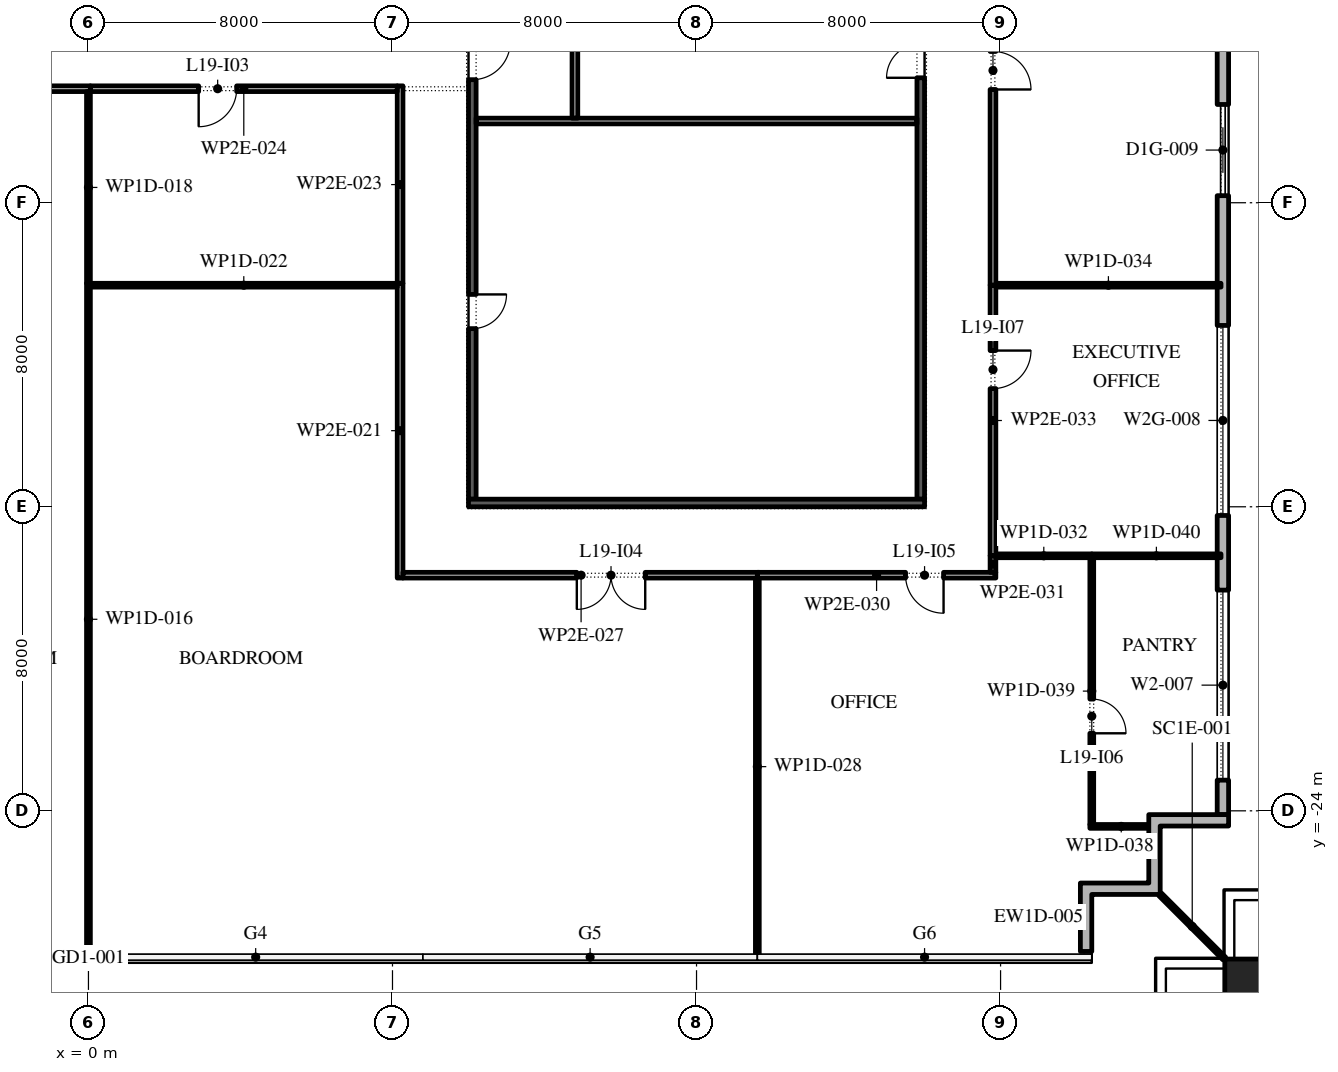
"""IFC4 building model, lengths in metres.
Left out: names, types, materials, properties, quantities, classifications, styles, units other than length and angle.
Written with IfcOpenShell. Run it as: python <this file> out.ifc"""

import sys

from ifc_helpers import new_model, si_unit, direction, frame, frame_2d, origin, origin_2d, place, context, subcontext, project, spatial, polyline, rectangle, outline, extrude, element, fill, save


model = new_model("IFC4")
c1 = context("Model", 3, precision=1e-05, world=origin(), true_north=direction((0.0, 1.0)))
c2 = subcontext(c1, "Body", "Model", "MODEL_VIEW")
j1 = project(units=[si_unit("LENGTHUNIT", "METRE"), si_unit("PLANEANGLEUNIT", "RADIAN")], contexts=[c1])
p1 = place(None, origin())
s1 = spatial("IfcSite", under=j1, at=p1, CompositionType="ELEMENT")
p2 = place(p1, origin())
s2 = spatial("IfcBuilding", under=s1, at=p2, CompositionType="ELEMENT")
p3 = place(p2, frame((0.0, 0.0, 90.0)))
s3 = spatial("IfcBuildingStorey", under=s2, at=p3, CompositionType="ELEMENT", Elevation=90.0)
p4 = place(p3, frame((30.6, -28.6, 0.0), z_axis=(0.0, 0.0, 1.0), x_axis=(1.0, 0.0, 0.0)))
e1 = element("IfcColumn", 1, at=p4, inside=s3, PredefinedType="COLUMN", context=c2, shape_type="SweptSolid", body=[
    extrude(rectangle(XDim=1.4, YDim=1.4, at=origin_2d()), origin(), (0.0, 0.0, 1.0), 4.2),
])
p5 = place(p3, frame((-8.8, -27.85, 0.0), z_axis=(0.0, 0.0, 1.0), x_axis=(1.0, 0.0, 0.0)))
e2 = element("IfcWall", 2, at=p5, inside=s3, PredefinedType="STANDARD", context=c2, shape_type="SweptSolid", body=[
    extrude(rectangle(XDim=8.8, YDim=0.3, at=frame_2d((4.4, 0.0))), origin(), (0.0, 0.0, 1.0), 3.9),
])
p6 = place(p5, frame((3.2, 0.0, 0.0)))
e3 = element("IfcOpeningElement", 3, at=p6, cuts=e2, PredefinedType="OPENING", context=c2, shape_type="SweptSolid", body=[
    extrude(rectangle(XDim=2.4, YDim=3.5, at=frame_2d((1.2, 1.75))), frame((0.0, 0.16, 0.0), z_axis=(0.0, -1.0, 0.0), x_axis=(1.0, 0.0, 0.0)), (0.0, 0.0, 1.0), 0.32),
])
p7 = place(p3, frame((29.85, -24.1, 0.0), z_axis=(0.0, 0.0, 1.0), x_axis=(0.0, 1.0, 0.0)))
e4 = element("IfcWall", 4, at=p7, inside=s3, PredefinedType="STANDARD", context=c2, shape_type="SweptSolid", body=[
    extrude(rectangle(XDim=49.5, YDim=0.3, at=frame_2d((24.75, 0.0))), origin(), (0.0, 0.0, 1.0), 3.9),
])
p8 = place(p7, frame((0.907, 0.0, 0.45)))
e5 = element("IfcOpeningElement", 5, at=p8, cuts=e4, PredefinedType="OPENING", context=c2, shape_type="SweptSolid", body=[
    extrude(rectangle(XDim=5.0, YDim=3.25, at=frame_2d((2.5, 1.625))), frame((0.0, 0.16, 0.0), z_axis=(0.0, -1.0, 0.0), x_axis=(1.0, 0.0, 0.0)), (0.0, 0.0, 1.0), 0.32),
])
p9 = place(p7, frame((7.871, 0.0, 0.45)))
e6 = element("IfcOpeningElement", 6, at=p9, cuts=e4, PredefinedType="OPENING", context=c2, shape_type="SweptSolid", body=[
    extrude(rectangle(XDim=5.0, YDim=2.725, at=frame_2d((2.5, 1.363))), frame((0.0, 0.16, 0.0), z_axis=(0.0, -1.0, 0.0), x_axis=(1.0, 0.0, 0.0)), (0.0, 0.0, 1.0), 0.32),
])
p10 = place(p7, frame((16.286, 0.0, 0.0)))
e7 = element("IfcOpeningElement", 7, at=p10, cuts=e4, PredefinedType="OPENING", context=c2, shape_type="SweptSolid", body=[
    extrude(rectangle(XDim=2.4, YDim=3.225, at=frame_2d((1.2, 1.613))), frame((0.0, 0.16, 0.0), z_axis=(0.0, -1.0, 0.0), x_axis=(1.0, 0.0, 0.0)), (0.0, 0.0, 1.0), 0.32),
])
p11 = place(p7, frame((22.1, 0.0, 0.45)))
e8 = element("IfcOpeningElement", 8, at=p11, cuts=e4, PredefinedType="OPENING", context=c2, shape_type="SweptSolid", body=[
    extrude(rectangle(XDim=5.0, YDim=3.25, at=frame_2d((2.5, 1.625))), frame((0.0, 0.16, 0.0), z_axis=(0.0, -1.0, 0.0), x_axis=(1.0, 0.0, 0.0)), (0.0, 0.0, 1.0), 0.32),
])
p12 = place(p7, frame((29.214, 0.0, 0.45)))
e9 = element("IfcOpeningElement", 9, at=p12, cuts=e4, PredefinedType="OPENING", context=c2, shape_type="SweptSolid", body=[
    extrude(rectangle(XDim=5.0, YDim=2.775, at=frame_2d((2.5, 1.387))), frame((0.0, 0.16, 0.0), z_axis=(0.0, -1.0, 0.0), x_axis=(1.0, 0.0, 0.0)), (0.0, 0.0, 1.0), 0.32),
])
p13 = place(p7, frame((36.329, 0.0, 0.45)))
e10 = element("IfcOpeningElement", 10, at=p13, cuts=e4, PredefinedType="OPENING", context=c2, shape_type="SweptSolid", body=[
    extrude(rectangle(XDim=5.0, YDim=3.25, at=frame_2d((2.5, 1.625))), frame((0.0, 0.16, 0.0), z_axis=(0.0, -1.0, 0.0), x_axis=(1.0, 0.0, 0.0)), (0.0, 0.0, 1.0), 0.32),
])
p14 = place(p7, frame((44.743, 0.0, 0.0)))
e11 = element("IfcOpeningElement", 11, at=p14, cuts=e4, PredefinedType="OPENING", context=c2, shape_type="SweptSolid", body=[
    extrude(rectangle(XDim=2.4, YDim=3.225, at=frame_2d((1.2, 1.613))), frame((0.0, 0.16, 0.0), z_axis=(0.0, -1.0, 0.0), x_axis=(1.0, 0.0, 0.0)), (0.0, 0.0, 1.0), 0.32),
])
p15 = place(p3, origin())
e12 = element("IfcWall", 12, at=p15, inside=s3, PredefinedType="STANDARD", context=c2, shape_type="SweptSolid", body=[
    extrude(outline(polyline([(27.9, -25.9), (27.9, -24.1), (30.0, -24.1), (30.0, -24.4), (28.2, -24.4), (28.2, -26.2), (26.4, -26.2), (26.4, -27.7), (26.1, -27.7), (26.1, -25.9), (27.9, -25.9)])), origin(), (0.0, 0.0, 1.0), 3.9),
])
p16 = place(p3, frame((28.2, -26.2, -0.05), z_axis=(0.0, 0.0, 1.0), x_axis=(0.707106781187, -0.707106781187, 0.0)))
e13 = element("IfcWall", 13, at=p16, inside=s3, PredefinedType="STANDARD", context=c2, shape_type="SweptSolid", body=[
    extrude(rectangle(XDim=2.385, YDim=0.1, at=frame_2d((1.192, 0.0))), origin(), (0.0, 0.0, 1.0), 3.95),
])
p17 = place(p3, frame((21.9, -15.8, 0.0), z_axis=(0.0, 0.0, 1.0), x_axis=(0.0, 1.0, 0.0)))
e14 = element("IfcWall", 14, at=p17, inside=s3, PredefinedType="SHEAR", context=c2, shape_type="SweptSolid", body=[
    extrude(rectangle(XDim=13.05, YDim=0.2, at=frame_2d((6.525, 0.0))), origin(), (0.0, 0.0, 1.0), 3.9),
])
p18 = place(p17, frame((11.087, 0.0, 0.0)))
e15 = element("IfcOpeningElement", 15, at=p18, cuts=e14, PredefinedType="OPENING", context=c2, shape_type="SweptSolid", body=[
    extrude(rectangle(XDim=0.9, YDim=2.1, at=frame_2d((0.45, 1.05))), frame((0.0, 0.11, 0.0), z_axis=(0.0, -1.0, 0.0), x_axis=(1.0, 0.0, 0.0)), (0.0, 0.0, 1.0), 0.22),
])
p19 = place(p3, frame((10.1, -15.8, 0.0), z_axis=(0.0, 0.0, 1.0), x_axis=(0.0, 1.0, 0.0)))
e16 = element("IfcWall", 16, at=p19, inside=s3, PredefinedType="SHEAR", context=c2, shape_type="SweptSolid", body=[
    extrude(rectangle(XDim=13.05, YDim=0.2, at=frame_2d((6.525, 0.0))), origin(), (0.0, 0.0, 1.0), 3.9),
])
p20 = place(p19, frame((4.488, 0.0, 0.0)))
e17 = element("IfcOpeningElement", 17, at=p20, cuts=e16, PredefinedType="OPENING", context=c2, shape_type="SweptSolid", body=[
    extrude(rectangle(XDim=0.9, YDim=2.1, at=frame_2d((0.45, 1.05))), frame((0.0, 0.11, 0.0), z_axis=(0.0, -1.0, 0.0), x_axis=(1.0, 0.0, 0.0)), (0.0, 0.0, 1.0), 0.22),
])
p21 = place(p19, frame((11.038, 0.0, 0.0)))
e18 = element("IfcOpeningElement", 18, at=p21, cuts=e16, PredefinedType="OPENING", context=c2, shape_type="SweptSolid", body=[
    extrude(rectangle(XDim=1.0, YDim=2.1, at=frame_2d((0.5, 1.05))), frame((0.0, 0.11, 0.0), z_axis=(0.0, -1.0, 0.0), x_axis=(1.0, 0.0, 0.0)), (0.0, 0.0, 1.0), 0.22),
])
p22 = place(p3, frame((10.0, -15.9, 0.0), z_axis=(0.0, 0.0, 1.0), x_axis=(1.0, 0.0, 0.0)))
e19 = element("IfcWall", 19, at=p22, inside=s3, PredefinedType="SHEAR", context=c2, shape_type="SweptSolid", body=[
    extrude(rectangle(XDim=12.0, YDim=0.2, at=frame_2d((6.0, 0.0))), origin(), (0.0, 0.0, 1.0), 3.9),
])
p23 = place(p3, frame((10.2, -5.85, 0.0), z_axis=(0.0, 0.0, 1.0), x_axis=(1.0, 0.0, 0.0)))
e20 = element("IfcWall", 20, at=p23, inside=s3, PredefinedType="PARTITIONING", context=c2, shape_type="SweptSolid", body=[
    extrude(rectangle(XDim=11.6, YDim=0.15, at=frame_2d((5.8, 0.0))), origin(), (0.0, 0.0, 1.0), 3.9),
])
p24 = place(p3, frame((12.8, -5.775, 0.0), z_axis=(0.0, 0.0, 1.0), x_axis=(0.0, 1.0, 0.0)))
e21 = element("IfcWall", 21, at=p24, inside=s3, PredefinedType="PARTITIONING", context=c2, shape_type="SweptSolid", body=[
    extrude(rectangle(XDim=3.025, YDim=0.15, at=frame_2d((1.512, 0.0))), origin(), (0.0, 0.0, 1.0), 3.9),
])
p25 = place(p3, frame((0.0, -10.12, 0.0), z_axis=(0.0, 0.0, 1.0), x_axis=(0.0, -1.0, 0.0)))
e22 = element("IfcWall", 22, at=p25, inside=s3, PredefinedType="PARTITIONING", context=c2, shape_type="SweptSolid", body=[
    extrude(rectangle(XDim=17.68, YDim=0.1, at=frame_2d((8.84, 0.0))), origin(), (0.0, 0.0, 1.0), 3.9),
])
p26 = place(p3, frame((0.05, -5.0, 0.0), z_axis=(0.0, 0.0, 1.0), x_axis=(-1.0, 0.0, 0.0)))
e23 = element("IfcWall", 23, at=p26, inside=s3, PredefinedType="PARTITIONING", context=c2, shape_type="SweptSolid", body=[
    extrude(rectangle(XDim=8.175, YDim=0.15, at=frame_2d((4.087, 0.0))), origin(), (0.0, 0.0, 1.0), 3.9),
])
p27 = place(p3, frame((0.0, -5.075, 0.0), z_axis=(0.0, 0.0, 1.0), x_axis=(0.0, -1.0, 0.0)))
e24 = element("IfcWall", 24, at=p27, inside=s3, PredefinedType="PARTITIONING", context=c2, shape_type="SweptSolid", body=[
    extrude(rectangle(XDim=5.045, YDim=0.1, at=frame_2d((2.522, 0.0))), origin(), (0.0, 0.0, 1.0), 3.9),
])
p28 = place(p3, frame((8.2, -17.875, 0.0), z_axis=(0.0, 0.0, 1.0), x_axis=(0.0, 1.0, 0.0)))
e25 = element("IfcWall", 25, at=p28, inside=s3, PredefinedType="PARTITIONING", context=c2, shape_type="SweptSolid", body=[
    extrude(rectangle(XDim=7.755, YDim=0.15, at=frame_2d((3.877, 0.0))), origin(), (0.0, 0.0, 1.0), 3.9),
])
p29 = place(p3, frame((8.125, -10.17, 0.0), z_axis=(0.0, 0.0, 1.0), x_axis=(-1.0, 0.0, 0.0)))
e26 = element("IfcWall", 26, at=p29, inside=s3, PredefinedType="PARTITIONING", context=c2, shape_type="SweptSolid", body=[
    extrude(rectangle(XDim=8.075, YDim=0.1, at=frame_2d((4.038, 0.0))), origin(), (0.0, 0.0, 1.0), 3.9),
])
p30 = place(p3, frame((8.2, -10.12, 0.0), z_axis=(0.0, 0.0, 1.0), x_axis=(0.0, 1.0, 0.0)))
e27 = element("IfcWall", 27, at=p30, inside=s3, PredefinedType="PARTITIONING", context=c2, shape_type="SweptSolid", body=[
    extrude(rectangle(XDim=5.195, YDim=0.15, at=frame_2d((2.598, 0.0))), origin(), (0.0, 0.0, 1.0), 3.9),
])
p31 = place(p3, frame((8.125, -5.0, 0.0), z_axis=(0.0, 0.0, 1.0), x_axis=(-1.0, 0.0, 0.0)))
e28 = element("IfcWall", 28, at=p31, inside=s3, PredefinedType="PARTITIONING", context=c2, shape_type="SweptSolid", body=[
    extrude(rectangle(XDim=8.075, YDim=0.15, at=frame_2d((4.038, 0.0))), origin(), (0.0, 0.0, 1.0), 3.9),
])
p32 = place(p31, frame((4.225, 0.0, 0.0)))
e29 = element("IfcOpeningElement", 29, at=p32, cuts=e28, PredefinedType="OPENING", context=c2, shape_type="SweptSolid", body=[
    extrude(rectangle(XDim=1.0, YDim=2.1, at=frame_2d((0.5, 1.05))), frame((0.0, 0.085, 0.0), z_axis=(0.0, -1.0, 0.0), x_axis=(1.0, 0.0, 0.0)), (0.0, 0.0, 1.0), 0.17),
])
p33 = place(p3, frame((17.65, -17.8, 0.0), z_axis=(0.0, 0.0, 1.0), x_axis=(-1.0, 0.0, 0.0)))
e30 = element("IfcWall", 30, at=p33, inside=s3, PredefinedType="PARTITIONING", context=c2, shape_type="SweptSolid", body=[
    extrude(rectangle(XDim=9.375, YDim=0.15, at=frame_2d((4.688, 0.0))), origin(), (0.0, 0.0, 1.0), 3.9),
])
p34 = place(p33, frame((3.0, 0.0, 0.0)))
e31 = element("IfcOpeningElement", 31, at=p34, cuts=e30, PredefinedType="OPENING", context=c2, shape_type="SweptSolid", body=[
    extrude(rectangle(XDim=1.8, YDim=2.1, at=frame_2d((0.9, 1.05))), frame((0.0, 0.085, 0.0), z_axis=(0.0, -1.0, 0.0), x_axis=(1.0, 0.0, 0.0)), (0.0, 0.0, 1.0), 0.17),
])
p35 = place(p3, frame((17.6, -17.875, 0.0), z_axis=(0.0, 0.0, 1.0), x_axis=(0.0, -1.0, 0.0)))
e32 = element("IfcWall", 32, at=p35, inside=s3, PredefinedType="PARTITIONING", context=c2, shape_type="SweptSolid", body=[
    extrude(rectangle(XDim=9.925, YDim=0.1, at=frame_2d((4.962, 0.0))), origin(), (0.0, 0.0, 1.0), 3.9),
])
p36 = place(p3, frame((23.875, -17.8, 0.0), z_axis=(0.0, 0.0, 1.0), x_axis=(-1.0, 0.0, 0.0)))
e33 = element("IfcWall", 33, at=p36, inside=s3, PredefinedType="PARTITIONING", context=c2, shape_type="SweptSolid", body=[
    extrude(rectangle(XDim=6.275, YDim=0.15, at=frame_2d((3.137, 0.0))), origin(), (0.0, 0.0, 1.0), 3.9),
])
p37 = place(p36, frame((1.375, 0.0, 0.0)))
e34 = element("IfcOpeningElement", 34, at=p37, cuts=e33, PredefinedType="OPENING", context=c2, shape_type="SweptSolid", body=[
    extrude(rectangle(XDim=1.0, YDim=2.1, at=frame_2d((0.5, 1.05))), frame((0.0, 0.085, 0.0), z_axis=(0.0, -1.0, 0.0), x_axis=(1.0, 0.0, 0.0)), (0.0, 0.0, 1.0), 0.17),
])
p38 = place(p3, frame((23.8, -17.29, 0.0), z_axis=(0.0, 0.0, 1.0), x_axis=(0.0, -1.0, 0.0)))
e35 = element("IfcWall", 35, at=p38, inside=s3, PredefinedType="PARTITIONING", context=c2, shape_type="SweptSolid", body=[
    extrude(rectangle(XDim=0.435, YDim=0.15, at=frame_2d((0.218, 0.0))), origin(), (0.0, 0.0, 1.0), 3.9),
])
p39 = place(p3, frame((23.875, -17.29, 0.0), z_axis=(0.0, 0.0, 1.0), x_axis=(1.0, 0.0, 0.0)))
e36 = element("IfcWall", 36, at=p39, inside=s3, PredefinedType="PARTITIONING", context=c2, shape_type="SweptSolid", body=[
    extrude(rectangle(XDim=2.525, YDim=0.1, at=frame_2d((1.262, 0.0))), origin(), (0.0, 0.0, 1.0), 3.9),
])
p40 = place(p3, frame((23.8, -10.17, 0.0), z_axis=(0.0, 0.0, 1.0), x_axis=(0.0, -1.0, 0.0)))
e37 = element("IfcWall", 37, at=p40, inside=s3, PredefinedType="PARTITIONING", context=c2, shape_type="SweptSolid", body=[
    extrude(rectangle(XDim=7.12, YDim=0.15, at=frame_2d((3.56, 0.0))), origin(), (0.0, 0.0, 1.0), 3.9),
])
p41 = place(p40, frame((1.72, 0.0, 0.0)))
e38 = element("IfcOpeningElement", 38, at=p41, cuts=e37, PredefinedType="OPENING", context=c2, shape_type="SweptSolid", body=[
    extrude(rectangle(XDim=1.0, YDim=2.1, at=frame_2d((0.5, 1.05))), frame((0.0, 0.085, 0.0), z_axis=(0.0, -1.0, 0.0), x_axis=(1.0, 0.0, 0.0)), (0.0, 0.0, 1.0), 0.17),
])
p42 = place(p3, frame((23.875, -10.17, 0.0), z_axis=(0.0, 0.0, 1.0), x_axis=(1.0, 0.0, 0.0)))
e39 = element("IfcWall", 39, at=p42, inside=s3, PredefinedType="PARTITIONING", context=c2, shape_type="SweptSolid", body=[
    extrude(rectangle(XDim=5.925, YDim=0.1, at=frame_2d((2.962, 0.0))), origin(), (0.0, 0.0, 1.0), 3.9),
])
p43 = place(p3, frame((23.8, 4.06, 0.0), z_axis=(0.0, 0.0, 1.0), x_axis=(0.0, -1.0, 0.0)))
e40 = element("IfcWall", 40, at=p43, inside=s3, PredefinedType="PARTITIONING", context=c2, shape_type="SweptSolid", body=[
    extrude(rectangle(XDim=14.23, YDim=0.15, at=frame_2d((7.115, 0.0))), origin(), (0.0, 0.0, 1.0), 3.9),
])
p44 = place(p43, frame((8.08, 0.0, 0.0)))
e41 = element("IfcOpeningElement", 41, at=p44, cuts=e40, PredefinedType="OPENING", context=c2, shape_type="SweptSolid", body=[
    extrude(rectangle(XDim=1.0, YDim=2.1, at=frame_2d((0.5, 1.05))), frame((0.0, 0.085, 0.0), z_axis=(0.0, -1.0, 0.0), x_axis=(1.0, 0.0, 0.0)), (0.0, 0.0, 1.0), 0.17),
])
p45 = place(p3, frame((26.35, -24.41, 0.0), z_axis=(0.0, 0.0, 1.0), x_axis=(1.0, 0.0, 0.0)))
e42 = element("IfcWall", 42, at=p45, inside=s3, PredefinedType="PARTITIONING", context=c2, shape_type="SweptSolid", body=[
    extrude(rectangle(XDim=1.65, YDim=0.1, at=frame_2d((0.825, 0.0))), origin(), (0.0, 0.0, 1.0), 3.9),
])
p46 = place(p3, frame((26.4, -17.34, 0.0), z_axis=(0.0, 0.0, 1.0), x_axis=(0.0, -1.0, 0.0)))
e43 = element("IfcWall", 43, at=p46, inside=s3, PredefinedType="PARTITIONING", context=c2, shape_type="SweptSolid", body=[
    extrude(rectangle(XDim=7.02, YDim=0.1, at=frame_2d((3.51, 0.0))), origin(), (0.0, 0.0, 1.0), 3.9),
])
p47 = place(p46, frame((3.72, 0.0, 0.0)))
e44 = element("IfcOpeningElement", 44, at=p47, cuts=e43, PredefinedType="OPENING", context=c2, shape_type="SweptSolid", body=[
    extrude(rectangle(XDim=0.9, YDim=2.1, at=frame_2d((0.45, 1.05))), frame((0.0, 0.06, 0.0), z_axis=(0.0, -1.0, 0.0), x_axis=(1.0, 0.0, 0.0)), (0.0, 0.0, 1.0), 0.12),
])
p48 = place(p3, frame((26.4, -17.29, 0.0), z_axis=(0.0, 0.0, 1.0), x_axis=(1.0, 0.0, 0.0)))
e45 = element("IfcWall", 45, at=p48, inside=s3, PredefinedType="PARTITIONING", context=c2, shape_type="SweptSolid", body=[
    extrude(rectangle(XDim=3.4, YDim=0.1, at=frame_2d((1.7, 0.0))), origin(), (0.0, 0.0, 1.0), 3.9),
])
p49 = place(p8, origin())
e46 = element("IfcWindow", 46, at=p49, inside=s3, PartitioningType="DOUBLE_PANEL_VERTICAL", PredefinedType="WINDOW", context=c2, shape_type="SweptSolid", body=[
    extrude(rectangle(XDim=5.0, YDim=3.25, at=frame_2d((2.5, 1.625))), frame((0.0, 0.03, 0.0), z_axis=(0.0, -1.0, 0.0), x_axis=(1.0, 0.0, 0.0)), (0.0, 0.0, 1.0), 0.06),
])
fill(e5, e46)
p50 = place(p9, origin())
e47 = element("IfcWindow", 47, at=p50, inside=s3, PartitioningType="DOUBLE_PANEL_VERTICAL", PredefinedType="WINDOW", context=c2, shape_type="SweptSolid", body=[
    extrude(rectangle(XDim=5.0, YDim=2.725, at=frame_2d((2.5, 1.363))), frame((0.0, 0.03, 0.0), z_axis=(0.0, -1.0, 0.0), x_axis=(1.0, 0.0, 0.0)), (0.0, 0.0, 1.0), 0.06),
])
fill(e6, e47)
p51 = place(p10, origin())
e48 = element("IfcDoor", 48, at=p51, inside=s3, OperationType="DOUBLE_DOOR_SLIDING", PredefinedType="DOOR", context=c2, shape_type="SweptSolid", body=[
    extrude(rectangle(XDim=2.4, YDim=3.225, at=frame_2d((1.2, 1.613))), frame((0.0, 0.025, 0.0), z_axis=(0.0, -1.0, 0.0), x_axis=(1.0, 0.0, 0.0)), (0.0, 0.0, 1.0), 0.05),
])
fill(e7, e48)
p52 = place(p20, frame((0.9, -0.15, 0.0), z_axis=(0.0, 0.0, 1.0), x_axis=(-1.0, 0.0, 0.0)))
e49 = element("IfcDoor", 49, at=p52, inside=s3, OperationType="SINGLE_SWING_RIGHT", PredefinedType="DOOR", context=c2, shape_type="SweptSolid", body=[
    extrude(rectangle(XDim=0.9, YDim=2.1, at=frame_2d((0.45, 1.05))), frame((0.0, -0.05, 0.0), z_axis=(0.0, -1.0, 0.0), x_axis=(1.0, 0.0, 0.0)), (0.0, 0.0, 1.0), 0.05),
])
fill(e17, e49)
p53 = place(p21, frame((1.0, -0.15, 0.0), z_axis=(0.0, 0.0, 1.0), x_axis=(-1.0, 0.0, 0.0)))
e50 = element("IfcDoor", 50, at=p53, inside=s3, OperationType="SINGLE_SWING_RIGHT", PredefinedType="DOOR", context=c2, shape_type="SweptSolid", body=[
    extrude(rectangle(XDim=1.0, YDim=2.1, at=frame_2d((0.5, 1.05))), frame((0.0, -0.05, 0.0), z_axis=(0.0, -1.0, 0.0), x_axis=(1.0, 0.0, 0.0)), (0.0, 0.0, 1.0), 0.05),
])
fill(e18, e50)
p54 = place(p18, origin())
e51 = element("IfcDoor", 51, at=p54, inside=s3, OperationType="SINGLE_SWING_RIGHT", PredefinedType="DOOR", context=c2, shape_type="SweptSolid", body=[
    extrude(rectangle(XDim=0.9, YDim=2.1, at=frame_2d((0.45, 1.05))), frame((0.0, 0.1, 0.0), z_axis=(0.0, -1.0, 0.0), x_axis=(1.0, 0.0, 0.0)), (0.0, 0.0, 1.0), 0.05),
])
fill(e15, e51)
p55 = place(p32, origin())
e52 = element("IfcDoor", 52, at=p55, inside=s3, OperationType="SINGLE_SWING_LEFT", PredefinedType="DOOR", context=c2, shape_type="SweptSolid", body=[
    extrude(rectangle(XDim=1.0, YDim=2.1, at=frame_2d((0.5, 1.05))), frame((0.0, 0.025, 0.0), z_axis=(0.0, -1.0, 0.0), x_axis=(1.0, 0.0, 0.0)), (0.0, 0.0, 1.0), 0.05),
])
fill(e29, e52)
p56 = place(p34, origin())
e53 = element("IfcDoor", 53, at=p56, inside=s3, OperationType="SINGLE_SWING_RIGHT", PredefinedType="DOOR", context=c2, shape_type="SweptSolid", body=[
    extrude(rectangle(XDim=1.8, YDim=2.1, at=frame_2d((0.9, 1.05))), frame((0.0, 0.025, 0.0), z_axis=(0.0, -1.0, 0.0), x_axis=(1.0, 0.0, 0.0)), (0.0, 0.0, 1.0), 0.05),
])
fill(e31, e53)
p57 = place(p37, origin())
e54 = element("IfcDoor", 54, at=p57, inside=s3, OperationType="SINGLE_SWING_RIGHT", PredefinedType="DOOR", context=c2, shape_type="SweptSolid", body=[
    extrude(rectangle(XDim=1.0, YDim=2.1, at=frame_2d((0.5, 1.05))), frame((0.0, 0.025, 0.0), z_axis=(0.0, -1.0, 0.0), x_axis=(1.0, 0.0, 0.0)), (0.0, 0.0, 1.0), 0.05),
])
fill(e34, e54)
p58 = place(p47, origin())
e55 = element("IfcDoor", 55, at=p58, inside=s3, OperationType="SINGLE_SWING_LEFT", PredefinedType="DOOR", context=c2, shape_type="SweptSolid", body=[
    extrude(rectangle(XDim=0.9, YDim=2.1, at=frame_2d((0.45, 1.05))), frame((0.0, 0.025, 0.0), z_axis=(0.0, -1.0, 0.0), x_axis=(1.0, 0.0, 0.0)), (0.0, 0.0, 1.0), 0.05),
])
fill(e44, e55)
p59 = place(p41, origin())
e56 = element("IfcDoor", 56, at=p59, inside=s3, OperationType="SINGLE_SWING_RIGHT", PredefinedType="DOOR", context=c2, shape_type="SweptSolid", body=[
    extrude(rectangle(XDim=1.0, YDim=2.1, at=frame_2d((0.5, 1.05))), frame((0.0, 0.025, 0.0), z_axis=(0.0, -1.0, 0.0), x_axis=(1.0, 0.0, 0.0)), (0.0, 0.0, 1.0), 0.05),
])
fill(e38, e56)
p60 = place(p44, origin())
e57 = element("IfcDoor", 57, at=p60, inside=s3, OperationType="SINGLE_SWING_LEFT", PredefinedType="DOOR", context=c2, shape_type="SweptSolid", body=[
    extrude(rectangle(XDim=1.0, YDim=2.1, at=frame_2d((0.5, 1.05))), frame((0.0, 0.025, 0.0), z_axis=(0.0, -1.0, 0.0), x_axis=(1.0, 0.0, 0.0)), (0.0, 0.0, 1.0), 0.05),
])
fill(e41, e57)
save(model, sys.argv[1])
